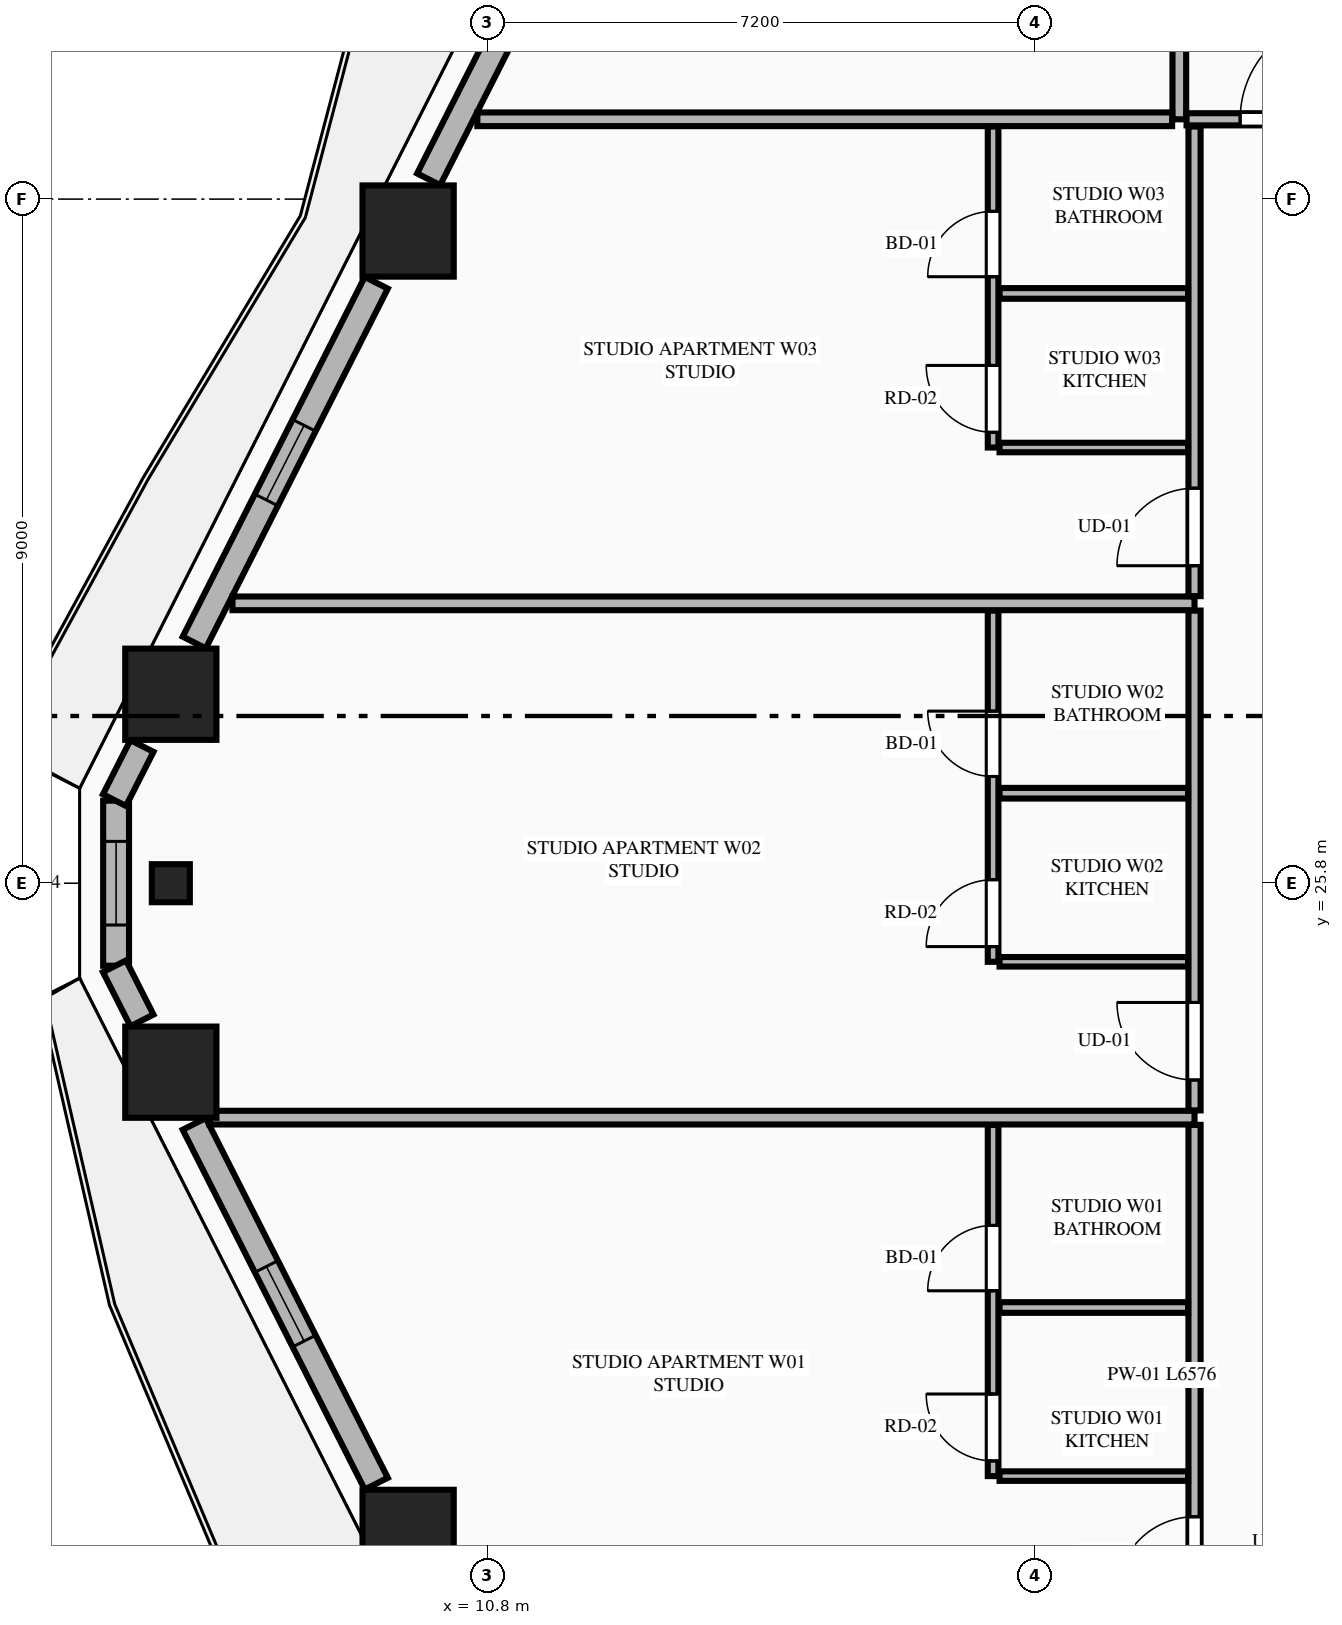
"""IFC4 building model, lengths in metres.
Left out: names, types, materials, properties, quantities, classifications, styles, units other than length and angle.
Written with IfcOpenShell. Run it as: python <this file> out.ifc"""

import sys

from ifc_helpers import new_model, si_unit, direction, frame, frame_2d, origin, origin_2d, place, context, subcontext, project, spatial, rectangle, extrude, element, fill, save


model = new_model("IFC4")
c1 = context("Model", 3, precision=1e-05, world=origin(), true_north=direction((0.0, 1.0)))
c2 = subcontext(c1, "Body", "Model", "MODEL_VIEW")
j1 = project(units=[si_unit("LENGTHUNIT", "METRE"), si_unit("PLANEANGLEUNIT", "RADIAN")], contexts=[c1])
p1 = place(None, origin())
s1 = spatial("IfcSite", under=j1, at=p1, CompositionType="ELEMENT")
p2 = place(p1, origin())
s2 = spatial("IfcBuilding", under=s1, at=p2, CompositionType="ELEMENT")
p3 = place(p2, frame((0.0, 0.0, 39.1)))
s3 = spatial("IfcBuildingStorey", under=s2, at=p3, CompositionType="ELEMENT", Elevation=39.1)
for number, where, z_axis, x_axis in (
    (1, (9.754, 34.38, 0.0), (0.0, 0.0, 1.0), (1.0, 0.0, 0.0)),
    (2, (6.632, 28.286, 0.0), (0.0, 0.0, 1.0), (1.0, 0.0, 0.0)),
    (3, (6.632, 23.314, 0.0), (0.0, 0.0, 1.0), (1.0, 0.0, 0.0)),
    (4, (9.754, 17.22, 0.0), (0.0, 0.0, 1.0), (1.0, 0.0, 0.0)),
):
    element("IfcColumn", number, at=place(p3, frame(where, z_axis=z_axis, x_axis=x_axis)), inside=s3, PredefinedType="COLUMN", context=c2, shape_type="SweptSolid", body=[
        extrude(rectangle(XDim=1.2, YDim=1.2, at=origin_2d()), origin(), (0.0, 0.0, 1.0), 3.55),
    ])
p4 = place(p3, frame((6.632, 25.8, 0.0), z_axis=(0.0, 0.0, 1.0), x_axis=(0.0, -1.0, 0.0)))
e5 = element("IfcColumn", 5, at=p4, inside=s3, PredefinedType="PILASTER", context=c2, shape_type="SweptSolid", body=[
    extrude(rectangle(XDim=0.5, YDim=0.35, at=origin_2d()), origin(), (0.0, 0.0, 1.0), 3.55),
])
p5 = place(p3, frame((5.912, 26.886, 0.0), z_axis=(0.0, 0.0, 1.0), x_axis=(0.0, -1.0, 0.0)))
e6 = element("IfcWall", 6, at=p5, inside=s3, PredefinedType="STANDARD", context=c2, shape_type="SweptSolid", body=[
    extrude(rectangle(XDim=2.172, YDim=0.34, at=frame_2d((1.086, 0.0))), origin(), (0.0, 0.0, 1.0), 3.33),
])
p6 = place(p5, frame((0.536, 0.0, 0.75)))
e7 = element("IfcOpeningElement", 7, at=p6, cuts=e6, PredefinedType="OPENING", context=c2, shape_type="SweptSolid", body=[
    extrude(rectangle(XDim=1.1, YDim=2.0, at=frame_2d((0.55, 1.0))), frame((0.0, 0.18, 0.0), z_axis=(0.0, -1.0, 0.0), x_axis=(1.0, 0.0, 0.0)), (0.0, 0.0, 1.0), 0.36),
])
p7 = place(p3, frame((12.529, 40.01, 0.0), z_axis=(0.0, 0.0, 1.0), x_axis=(-0.451627137896, -0.892206774417, 0.0)))
e8 = element("IfcWall", 8, at=p7, inside=s3, PredefinedType="STANDARD", context=c2, shape_type="SweptSolid", body=[
    extrude(rectangle(XDim=5.547, YDim=0.34, at=frame_2d((2.773, 0.0))), origin(), (0.0, 0.0, 1.0), 2.787),
])
p8 = place(p7, frame((1.656, 0.0, 0.0)))
e9 = element("IfcOpeningElement", 9, at=p8, cuts=e8, PredefinedType="OPENING", context=c2, shape_type="SweptSolid", body=[
    extrude(rectangle(XDim=1.1, YDim=2.25, at=frame_2d((0.55, 1.125))), frame((0.0, 0.18, 0.0), z_axis=(0.0, -1.0, 0.0), x_axis=(1.0, 0.0, 0.0)), (0.0, 0.0, 1.0), 0.36),
])
p9 = place(p3, frame((9.335, 33.699, 0.0), z_axis=(0.0, 0.0, 1.0), x_axis=(-0.451590635984, -0.892225250422, 0.0)))
e10 = element("IfcWall", 10, at=p9, inside=s3, PredefinedType="STANDARD", context=c2, shape_type="SweptSolid", body=[
    extrude(rectangle(XDim=5.303, YDim=0.34, at=frame_2d((2.652, 0.0))), origin(), (0.0, 0.0, 1.0), 2.787),
])
p10 = place(p9, frame((2.102, 0.0, 0.75)))
e11 = element("IfcOpeningElement", 11, at=p10, cuts=e10, PredefinedType="OPENING", context=c2, shape_type="SweptSolid", body=[
    extrude(rectangle(XDim=1.1, YDim=1.887, at=frame_2d((0.55, 0.943))), frame((0.0, 0.18, 0.0), z_axis=(0.0, -1.0, 0.0), x_axis=(1.0, 0.0, 0.0)), (0.0, 0.0, 1.0), 0.36),
])
for number, where, z_axis, x_axis in (
    (12, (6.252, 27.605, 0.0), (0.0, 0.0, 1.0), (-0.452, -0.892, 0.0)),
    (13, (5.891, 24.707, 0.0), (0.0, 0.0, 1.0), (0.452, -0.892, 0.0)),
):
    element("IfcWall", number, at=place(p3, frame(where, z_axis=z_axis, x_axis=x_axis)), inside=s3, PredefinedType="STANDARD", context=c2, shape_type="SweptSolid", body=[
        extrude(rectangle(XDim=0.798, YDim=0.34, at=frame_2d((0.399, 0.0))), origin(), (0.0, 0.0, 1.0), 3.33),
    ])
p11 = place(p3, frame((6.94, 22.633, 0.0), z_axis=(0.0, 0.0, 1.0), x_axis=(0.451572088722, -0.892234637686, 0.0)))
e14 = element("IfcWall", 14, at=p11, inside=s3, PredefinedType="STANDARD", context=c2, shape_type="SweptSolid", body=[
    extrude(rectangle(XDim=5.304, YDim=0.34, at=frame_2d((2.652, 0.0))), origin(), (0.0, 0.0, 1.0), 2.787),
])
p12 = place(p11, frame((2.102, 0.0, 0.75)))
e15 = element("IfcOpeningElement", 15, at=p12, cuts=e14, PredefinedType="OPENING", context=c2, shape_type="SweptSolid", body=[
    extrude(rectangle(XDim=1.1, YDim=1.887, at=frame_2d((0.55, 0.943))), frame((0.0, 0.18, 0.0), z_axis=(0.0, -1.0, 0.0), x_axis=(1.0, 0.0, 0.0)), (0.0, 0.0, 1.0), 0.36),
])
p13 = place(p3, frame((19.9, 35.85, 0.0), z_axis=(0.0, 0.0, 1.0), x_axis=(0.0, 1.0, 0.0)))
e16 = element("IfcWall", 16, at=p13, inside=s3, PredefinedType="PARTITIONING", context=c2, shape_type="SweptSolid", body=[
    extrude(rectangle(XDim=13.295, YDim=0.18, at=frame_2d((6.647, 0.0))), origin(), (0.0, 0.0, 1.0), 3.33),
])
p14 = place(p3, frame((19.995, 35.85, 0.0), z_axis=(0.0, 0.0, 1.0), x_axis=(1.0, 0.0, 0.0)))
e17 = element("IfcWall", 17, at=p14, inside=s3, PredefinedType="PARTITIONING", context=c2, shape_type="SweptSolid", body=[
    extrude(rectangle(XDim=24.81, YDim=0.16, at=frame_2d((12.405, 0.0))), origin(), (0.0, 0.0, 1.0), 3.33),
])
p15 = place(p14, frame((0.705, 0.0, 0.0)))
e18 = element("IfcOpeningElement", 18, at=p15, cuts=e17, PredefinedType="OPENING", context=c2, shape_type="SweptSolid", body=[
    extrude(rectangle(XDim=1.35, YDim=2.35, at=frame_2d((0.675, 1.175))), frame((0.0, 0.09, 0.0), z_axis=(0.0, -1.0, 0.0), x_axis=(1.0, 0.0, 0.0)), (0.0, 0.0, 1.0), 0.18),
])
p16 = place(p3, frame((10.665, 35.85, 0.0), z_axis=(0.0, 0.0, 1.0), x_axis=(1.0, 0.0, 0.0)))
e19 = element("IfcWall", 19, at=p16, inside=s3, PredefinedType="PARTITIONING", context=c2, shape_type="SweptSolid", body=[
    extrude(rectangle(XDim=9.14, YDim=0.18, at=frame_2d((4.57, 0.0))), origin(), (0.0, 0.0, 1.0), 3.33),
])
p17 = place(p3, frame((20.1, 16.045, 0.0), z_axis=(0.0, 0.0, 1.0), x_axis=(0.0, 1.0, 0.0)))
e20 = element("IfcWall", 20, at=p17, inside=s3, PredefinedType="PARTITIONING", context=c2, shape_type="SweptSolid", body=[
    extrude(rectangle(XDim=6.576, YDim=0.16, at=frame_2d((3.288, 0.0))), origin(), (0.0, 0.0, 1.0), 3.33),
])
p18 = place(p17, frame((0.4, 0.0, 0.0)))
e21 = element("IfcOpeningElement", 21, at=p18, cuts=e20, PredefinedType="OPENING", context=c2, shape_type="SweptSolid", body=[
    extrude(rectangle(XDim=1.02, YDim=2.25, at=frame_2d((0.51, 1.125))), frame((0.0, 0.09, 0.0), z_axis=(0.0, -1.0, 0.0), x_axis=(1.0, 0.0, 0.0)), (0.0, 0.0, 1.0), 0.18),
])
p19 = place(p3, frame((17.535, 18.0, 0.0), z_axis=(0.0, 0.0, 1.0), x_axis=(1.0, 0.0, 0.0)))
e22 = element("IfcWall", 22, at=p19, inside=s3, PredefinedType="PARTITIONING", context=c2, shape_type="SweptSolid", body=[
    extrude(rectangle(XDim=2.48, YDim=0.125, at=frame_2d((1.24, 0.0))), origin(), (0.0, 0.0, 1.0), 2.636),
])
p20 = place(p3, frame((17.45, 18.0, 0.0), z_axis=(0.0, 0.0, 1.0), x_axis=(0.0, 1.0, 0.0)))
e23 = element("IfcWall", 23, at=p20, inside=s3, PredefinedType="PLUMBINGWALL", context=c2, shape_type="SweptSolid", body=[
    extrude(rectangle(XDim=4.621, YDim=0.14, at=frame_2d((2.311, 0.0))), origin(), (0.0, 0.0, 1.0), 3.33),
])
p21 = place(p20, frame((2.438, 0.0, 0.0)))
e24 = element("IfcOpeningElement", 24, at=p21, cuts=e23, PredefinedType="OPENING", context=c2, shape_type="SweptSolid", body=[
    extrude(rectangle(XDim=0.86, YDim=2.1, at=frame_2d((0.43, 1.05))), frame((0.0, 0.08, 0.0), z_axis=(0.0, -1.0, 0.0), x_axis=(1.0, 0.0, 0.0)), (0.0, 0.0, 1.0), 0.16),
])
p22 = place(p20, frame((0.2, 0.0, 0.0)))
e25 = element("IfcOpeningElement", 25, at=p22, cuts=e23, PredefinedType="OPENING", context=c2, shape_type="SweptSolid", body=[
    extrude(rectangle(XDim=0.88, YDim=2.15, at=frame_2d((0.44, 1.075))), frame((0.0, 0.08, 0.0), z_axis=(0.0, -1.0, 0.0), x_axis=(1.0, 0.0, 0.0)), (0.0, 0.0, 1.0), 0.16),
])
p23 = place(p3, frame((17.535, 20.218, 0.0), z_axis=(0.0, 0.0, 1.0), x_axis=(1.0, 0.0, 0.0)))
e26 = element("IfcWall", 26, at=p23, inside=s3, PredefinedType="PLUMBINGWALL", context=c2, shape_type="SweptSolid", body=[
    extrude(rectangle(XDim=2.48, YDim=0.14, at=frame_2d((1.24, 0.0))), origin(), (0.0, 0.0, 1.0), 3.33),
])
p24 = place(p3, frame((7.14, 22.716, 0.0), z_axis=(0.0, 0.0, 1.0), x_axis=(1.0, 0.0, 0.0)))
e27 = element("IfcWall", 27, at=p24, inside=s3, PredefinedType="PARTITIONING", context=c2, shape_type="SweptSolid", body=[
    extrude(rectangle(XDim=12.96, YDim=0.18, at=frame_2d((6.48, 0.0))), origin(), (0.0, 0.0, 1.0), 3.33),
])
p25 = place(p3, frame((20.1, 22.811, 0.0), z_axis=(0.0, 0.0, 1.0), x_axis=(0.0, 1.0, 0.0)))
e28 = element("IfcWall", 28, at=p25, inside=s3, PredefinedType="PARTITIONING", context=c2, shape_type="SweptSolid", body=[
    extrude(rectangle(XDim=6.576, YDim=0.16, at=frame_2d((3.288, 0.0))), origin(), (0.0, 0.0, 1.0), 3.33),
])
p26 = place(p25, frame((0.4, 0.0, 0.0)))
e29 = element("IfcOpeningElement", 29, at=p26, cuts=e28, PredefinedType="OPENING", context=c2, shape_type="SweptSolid", body=[
    extrude(rectangle(XDim=1.02, YDim=2.25, at=frame_2d((0.51, 1.125))), frame((0.0, 0.09, 0.0), z_axis=(0.0, -1.0, 0.0), x_axis=(1.0, 0.0, 0.0)), (0.0, 0.0, 1.0), 0.18),
])
p27 = place(p3, frame((17.535, 24.766, 0.0), z_axis=(0.0, 0.0, 1.0), x_axis=(1.0, 0.0, 0.0)))
e30 = element("IfcWall", 30, at=p27, inside=s3, PredefinedType="PARTITIONING", context=c2, shape_type="SweptSolid", body=[
    extrude(rectangle(XDim=2.48, YDim=0.125, at=frame_2d((1.24, 0.0))), origin(), (0.0, 0.0, 1.0), 3.33),
])
p28 = place(p3, frame((17.45, 24.766, 0.0), z_axis=(0.0, 0.0, 1.0), x_axis=(0.0, 1.0, 0.0)))
e31 = element("IfcWall", 31, at=p28, inside=s3, PredefinedType="PLUMBINGWALL", context=c2, shape_type="SweptSolid", body=[
    extrude(rectangle(XDim=4.621, YDim=0.14, at=frame_2d((2.311, 0.0))), origin(), (0.0, 0.0, 1.0), 3.33),
])
p29 = place(p28, frame((2.438, 0.0, 0.0)))
e32 = element("IfcOpeningElement", 32, at=p29, cuts=e31, PredefinedType="OPENING", context=c2, shape_type="SweptSolid", body=[
    extrude(rectangle(XDim=0.86, YDim=2.1, at=frame_2d((0.43, 1.05))), frame((0.0, 0.08, 0.0), z_axis=(0.0, -1.0, 0.0), x_axis=(1.0, 0.0, 0.0)), (0.0, 0.0, 1.0), 0.16),
])
p30 = place(p28, frame((0.2, 0.0, 0.0)))
e33 = element("IfcOpeningElement", 33, at=p30, cuts=e31, PredefinedType="OPENING", context=c2, shape_type="SweptSolid", body=[
    extrude(rectangle(XDim=0.88, YDim=2.15, at=frame_2d((0.44, 1.075))), frame((0.0, 0.08, 0.0), z_axis=(0.0, -1.0, 0.0), x_axis=(1.0, 0.0, 0.0)), (0.0, 0.0, 1.0), 0.16),
])
p31 = place(p3, frame((17.535, 26.984, 0.0), z_axis=(0.0, 0.0, 1.0), x_axis=(1.0, 0.0, 0.0)))
e34 = element("IfcWall", 34, at=p31, inside=s3, PredefinedType="PLUMBINGWALL", context=c2, shape_type="SweptSolid", body=[
    extrude(rectangle(XDim=2.48, YDim=0.14, at=frame_2d((1.24, 0.0))), origin(), (0.0, 0.0, 1.0), 3.33),
])
p32 = place(p3, frame((7.443, 29.482, 0.0), z_axis=(0.0, 0.0, 1.0), x_axis=(1.0, 0.0, 0.0)))
e35 = element("IfcWall", 35, at=p32, inside=s3, PredefinedType="PARTITIONING", context=c2, shape_type="SweptSolid", body=[
    extrude(rectangle(XDim=12.657, YDim=0.18, at=frame_2d((6.329, 0.0))), origin(), (0.0, 0.0, 1.0), 3.33),
])
p33 = place(p3, frame((20.1, 29.577, 0.0), z_axis=(0.0, 0.0, 1.0), x_axis=(0.0, 1.0, 0.0)))
e36 = element("IfcWall", 36, at=p33, inside=s3, PredefinedType="PARTITIONING", context=c2, shape_type="SweptSolid", body=[
    extrude(rectangle(XDim=6.178, YDim=0.16, at=frame_2d((3.089, 0.0))), origin(), (0.0, 0.0, 1.0), 3.33),
])
p34 = place(p33, frame((0.4, 0.0, 0.0)))
e37 = element("IfcOpeningElement", 37, at=p34, cuts=e36, PredefinedType="OPENING", context=c2, shape_type="SweptSolid", body=[
    extrude(rectangle(XDim=1.02, YDim=2.25, at=frame_2d((0.51, 1.125))), frame((0.0, 0.09, 0.0), z_axis=(0.0, -1.0, 0.0), x_axis=(1.0, 0.0, 0.0)), (0.0, 0.0, 1.0), 0.18),
])
p35 = place(p3, frame((17.535, 31.532, 0.0), z_axis=(0.0, 0.0, 1.0), x_axis=(1.0, 0.0, 0.0)))
e38 = element("IfcWall", 38, at=p35, inside=s3, PredefinedType="PARTITIONING", context=c2, shape_type="SweptSolid", body=[
    extrude(rectangle(XDim=2.48, YDim=0.125, at=frame_2d((1.24, 0.0))), origin(), (0.0, 0.0, 1.0), 3.33),
])
p36 = place(p3, frame((17.45, 31.532, 0.0), z_axis=(0.0, 0.0, 1.0), x_axis=(0.0, 1.0, 0.0)))
e39 = element("IfcWall", 39, at=p36, inside=s3, PredefinedType="PLUMBINGWALL", context=c2, shape_type="SweptSolid", body=[
    extrude(rectangle(XDim=4.223, YDim=0.14, at=frame_2d((2.111, 0.0))), origin(), (0.0, 0.0, 1.0), 3.33),
])
p37 = place(p36, frame((2.247, 0.0, 0.0)))
e40 = element("IfcOpeningElement", 40, at=p37, cuts=e39, PredefinedType="OPENING", context=c2, shape_type="SweptSolid", body=[
    extrude(rectangle(XDim=0.86, YDim=2.1, at=frame_2d((0.43, 1.05))), frame((0.0, 0.08, 0.0), z_axis=(0.0, -1.0, 0.0), x_axis=(1.0, 0.0, 0.0)), (0.0, 0.0, 1.0), 0.16),
])
p38 = place(p36, frame((0.2, 0.0, 0.0)))
e41 = element("IfcOpeningElement", 41, at=p38, cuts=e39, PredefinedType="OPENING", context=c2, shape_type="SweptSolid", body=[
    extrude(rectangle(XDim=0.88, YDim=2.15, at=frame_2d((0.44, 1.075))), frame((0.0, 0.08, 0.0), z_axis=(0.0, -1.0, 0.0), x_axis=(1.0, 0.0, 0.0)), (0.0, 0.0, 1.0), 0.16),
])
p39 = place(p3, frame((17.535, 33.559, 0.0), z_axis=(0.0, 0.0, 1.0), x_axis=(1.0, 0.0, 0.0)))
e42 = element("IfcWall", 42, at=p39, inside=s3, PredefinedType="PLUMBINGWALL", context=c2, shape_type="SweptSolid", body=[
    extrude(rectangle(XDim=2.48, YDim=0.14, at=frame_2d((1.24, 0.0))), origin(), (0.0, 0.0, 1.0), 2.636),
])
p40 = place(p10, origin())
e43 = element("IfcWindow", 43, at=p40, inside=s3, PartitioningType="SINGLE_PANEL", PredefinedType="WINDOW", context=c2, shape_type="SweptSolid", body=[
    extrude(rectangle(XDim=1.1, YDim=1.887, at=frame_2d((0.55, 0.943))), frame((0.0, 0.03, 0.0), z_axis=(0.0, -1.0, 0.0), x_axis=(1.0, 0.0, 0.0)), (0.0, 0.0, 1.0), 0.06),
])
fill(e11, e43)
p41 = place(p12, origin())
e44 = element("IfcWindow", 44, at=p41, inside=s3, PartitioningType="SINGLE_PANEL", PredefinedType="WINDOW", context=c2, shape_type="SweptSolid", body=[
    extrude(rectangle(XDim=1.1, YDim=1.887, at=frame_2d((0.55, 0.943))), frame((0.0, 0.03, 0.0), z_axis=(0.0, -1.0, 0.0), x_axis=(1.0, 0.0, 0.0)), (0.0, 0.0, 1.0), 0.06),
])
fill(e15, e44)
p42 = place(p15, origin())
e45 = element("IfcDoor", 45, at=p42, inside=s3, OperationType="SINGLE_SWING_RIGHT", PredefinedType="DOOR", context=c2, shape_type="SweptSolid", body=[
    extrude(rectangle(XDim=1.35, YDim=2.35, at=frame_2d((0.675, 1.175))), frame((0.0, 0.025, 0.0), z_axis=(0.0, -1.0, 0.0), x_axis=(1.0, 0.0, 0.0)), (0.0, 0.0, 1.0), 0.05),
])
fill(e18, e45)
p43 = place(p21, origin())
e46 = element("IfcDoor", 46, at=p43, inside=s3, OperationType="SINGLE_SWING_LEFT", PredefinedType="DOOR", context=c2, shape_type="SweptSolid", body=[
    extrude(rectangle(XDim=0.86, YDim=2.1, at=frame_2d((0.43, 1.05))), frame((0.0, 0.025, 0.0), z_axis=(0.0, -1.0, 0.0), x_axis=(1.0, 0.0, 0.0)), (0.0, 0.0, 1.0), 0.05),
])
fill(e24, e46)
p44 = place(p18, origin())
e47 = element("IfcDoor", 47, at=p44, inside=s3, OperationType="SINGLE_SWING_LEFT", PredefinedType="DOOR", context=c2, shape_type="SweptSolid", body=[
    extrude(rectangle(XDim=1.02, YDim=2.25, at=frame_2d((0.51, 1.125))), frame((0.0, 0.025, 0.0), z_axis=(0.0, -1.0, 0.0), x_axis=(1.0, 0.0, 0.0)), (0.0, 0.0, 1.0), 0.05),
])
fill(e21, e47)
p45 = place(p22, origin())
e48 = element("IfcDoor", 48, at=p45, inside=s3, OperationType="SINGLE_SWING_RIGHT", PredefinedType="DOOR", context=c2, shape_type="SweptSolid", body=[
    extrude(rectangle(XDim=0.88, YDim=2.15, at=frame_2d((0.44, 1.075))), frame((0.0, 0.025, 0.0), z_axis=(0.0, -1.0, 0.0), x_axis=(1.0, 0.0, 0.0)), (0.0, 0.0, 1.0), 0.05),
])
fill(e25, e48)
p46 = place(p29, origin())
e49 = element("IfcDoor", 49, at=p46, inside=s3, OperationType="SINGLE_SWING_RIGHT", PredefinedType="DOOR", context=c2, shape_type="SweptSolid", body=[
    extrude(rectangle(XDim=0.86, YDim=2.1, at=frame_2d((0.43, 1.05))), frame((0.0, 0.025, 0.0), z_axis=(0.0, -1.0, 0.0), x_axis=(1.0, 0.0, 0.0)), (0.0, 0.0, 1.0), 0.05),
])
fill(e32, e49)
p47 = place(p26, origin())
e50 = element("IfcDoor", 50, at=p47, inside=s3, OperationType="SINGLE_SWING_RIGHT", PredefinedType="DOOR", context=c2, shape_type="SweptSolid", body=[
    extrude(rectangle(XDim=1.02, YDim=2.25, at=frame_2d((0.51, 1.125))), frame((0.0, 0.025, 0.0), z_axis=(0.0, -1.0, 0.0), x_axis=(1.0, 0.0, 0.0)), (0.0, 0.0, 1.0), 0.05),
])
fill(e29, e50)
p48 = place(p30, origin())
e51 = element("IfcDoor", 51, at=p48, inside=s3, OperationType="SINGLE_SWING_LEFT", PredefinedType="DOOR", context=c2, shape_type="SweptSolid", body=[
    extrude(rectangle(XDim=0.88, YDim=2.15, at=frame_2d((0.44, 1.075))), frame((0.0, 0.025, 0.0), z_axis=(0.0, -1.0, 0.0), x_axis=(1.0, 0.0, 0.0)), (0.0, 0.0, 1.0), 0.05),
])
fill(e33, e51)
p49 = place(p37, origin())
e52 = element("IfcDoor", 52, at=p49, inside=s3, OperationType="SINGLE_SWING_LEFT", PredefinedType="DOOR", context=c2, shape_type="SweptSolid", body=[
    extrude(rectangle(XDim=0.86, YDim=2.1, at=frame_2d((0.43, 1.05))), frame((0.0, 0.025, 0.0), z_axis=(0.0, -1.0, 0.0), x_axis=(1.0, 0.0, 0.0)), (0.0, 0.0, 1.0), 0.05),
])
fill(e40, e52)
p50 = place(p34, origin())
e53 = element("IfcDoor", 53, at=p50, inside=s3, OperationType="SINGLE_SWING_LEFT", PredefinedType="DOOR", context=c2, shape_type="SweptSolid", body=[
    extrude(rectangle(XDim=1.02, YDim=2.25, at=frame_2d((0.51, 1.125))), frame((0.0, 0.025, 0.0), z_axis=(0.0, -1.0, 0.0), x_axis=(1.0, 0.0, 0.0)), (0.0, 0.0, 1.0), 0.05),
])
fill(e37, e53)
p51 = place(p38, origin())
e54 = element("IfcDoor", 54, at=p51, inside=s3, OperationType="SINGLE_SWING_RIGHT", PredefinedType="DOOR", context=c2, shape_type="SweptSolid", body=[
    extrude(rectangle(XDim=0.88, YDim=2.15, at=frame_2d((0.44, 1.075))), frame((0.0, 0.025, 0.0), z_axis=(0.0, -1.0, 0.0), x_axis=(1.0, 0.0, 0.0)), (0.0, 0.0, 1.0), 0.05),
])
fill(e41, e54)
p52 = place(p6, origin())
e55 = element("IfcWindow", 55, at=p52, inside=s3, PartitioningType="SINGLE_PANEL", PredefinedType="WINDOW", context=c2, shape_type="SweptSolid", body=[
    extrude(rectangle(XDim=1.1, YDim=2.0, at=frame_2d((0.55, 1.0))), frame((0.0, 0.03, 0.0), z_axis=(0.0, -1.0, 0.0), x_axis=(1.0, 0.0, 0.0)), (0.0, 0.0, 1.0), 0.06),
])
fill(e7, e55)
save(model, sys.argv[1])
